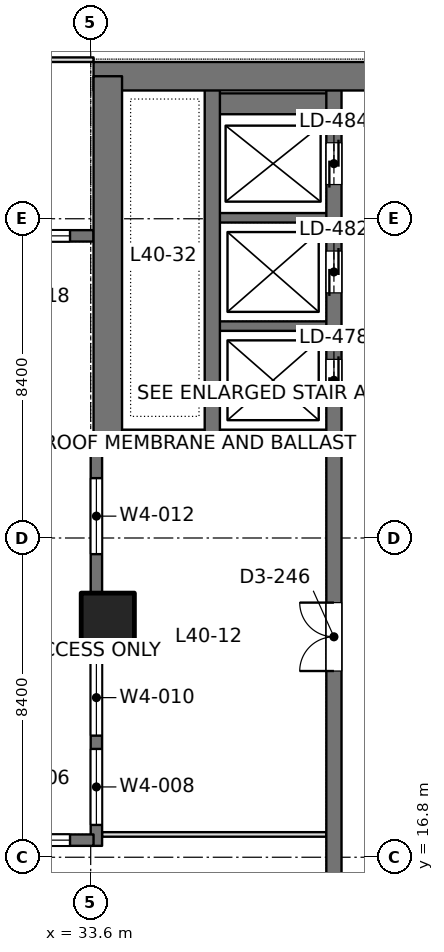
"""IFC4 building model, lengths in metres.
Left out: names, types, materials, properties, quantities, classifications, styles, units other than length and angle.
Written with IfcOpenShell. Run it as: python <this file> out.ifc"""

import sys

from ifc_helpers import new_model, si_unit, direction, frame, frame_2d, origin, origin_2d, place, context, subcontext, project, spatial, rectangle, extrude, element, fill, save


model = new_model("IFC4")
c1 = context("Model", 3, precision=1e-05, world=origin(), true_north=direction((0.0, 1.0)))
c2 = subcontext(c1, "Body", "Model", "MODEL_VIEW")
j1 = project(units=[si_unit("LENGTHUNIT", "METRE"), si_unit("PLANEANGLEUNIT", "RADIAN")], contexts=[c1])
p1 = place(None, origin())
s1 = spatial("IfcSite", under=j1, at=p1, CompositionType="ELEMENT")
p2 = place(p1, origin())
s2 = spatial("IfcBuilding", under=s1, at=p2, CompositionType="ELEMENT")
p3 = place(p2, frame((0.0, 0.0, 177.6)))
s3 = spatial("IfcBuildingStorey", under=s2, at=p3, CompositionType="ELEMENT", Elevation=177.6)
p4 = place(p3, frame((34.05, 23.05, 0.0), z_axis=(0.0, 0.0, 1.0), x_axis=(1.0, 0.0, 0.0)))
e1 = element("IfcColumn", 1, at=p4, inside=s3, PredefinedType="COLUMN", context=c2, shape_type="SweptSolid", body=[
    extrude(rectangle(XDim=1.4, YDim=1.4, at=origin_2d()), origin(), (0.0, 0.0, 1.0), 4.2),
])
p5 = place(p3, frame((33.675, 37.35, 0.0), z_axis=(0.0, 0.0, 1.0), x_axis=(1.0, 0.0, 0.0)))
e2 = element("IfcWall", 2, at=p5, inside=s3, PredefinedType="SHEAR", context=c2, shape_type="SweptSolid", body=[
    extrude(rectangle(XDim=17.85, YDim=0.75, at=frame_2d((8.925, 0.0))), origin(), (0.0, 0.0, 1.0), 4.2),
])
p6 = place(p5, frame((7.175, 0.0, 0.0)))
e3 = element("IfcOpeningElement", 3, at=p6, cuts=e2, PredefinedType="OPENING", context=c2, shape_type="SweptSolid", body=[
    extrude(rectangle(XDim=1.8, YDim=2.4, at=frame_2d((0.9, 1.2))), frame((0.0, 0.385, 0.0), z_axis=(0.0, -1.0, 0.0), x_axis=(1.0, 0.0, 0.0)), (0.0, 0.0, 1.0), 0.77),
])
p7 = place(p3, frame((34.05, 27.8, 0.0), z_axis=(0.0, 0.0, 1.0), x_axis=(0.0, 1.0, 0.0)))
e4 = element("IfcWall", 4, at=p7, inside=s3, PredefinedType="SHEAR", context=c2, shape_type="SweptSolid", body=[
    extrude(rectangle(XDim=9.55, YDim=0.75, at=frame_2d((4.775, 0.0))), origin(), (0.0, 0.0, 1.0), 4.2),
])
p8 = place(p3, frame((40.0, 13.05, 0.0), z_axis=(0.0, 0.0, 1.0), x_axis=(0.0, 1.0, 0.0)))
e5 = element("IfcWall", 5, at=p8, inside=s3, PredefinedType="SHEAR", context=c2, shape_type="SweptSolid", body=[
    extrude(rectangle(XDim=24.3, YDim=0.4, at=frame_2d((12.15, 0.0))), origin(), (0.0, 0.0, 1.0), 4.2),
])
p9 = place(p8, frame((15.75, 0.0, 0.0)))
e6 = element("IfcOpeningElement", 6, at=p9, cuts=e5, PredefinedType="OPENING", context=c2, shape_type="SweptSolid", body=[
    extrude(rectangle(XDim=1.1, YDim=2.2, at=frame_2d((0.55, 1.1))), frame((0.0, 0.21, 0.0), z_axis=(0.0, -1.0, 0.0), x_axis=(1.0, 0.0, 0.0)), (0.0, 0.0, 1.0), 0.42),
])
p10 = place(p8, frame((18.6, 0.0, 0.0)))
e7 = element("IfcOpeningElement", 7, at=p10, cuts=e5, PredefinedType="OPENING", context=c2, shape_type="SweptSolid", body=[
    extrude(rectangle(XDim=1.1, YDim=2.2, at=frame_2d((0.55, 1.1))), frame((0.0, 0.21, 0.0), z_axis=(0.0, -1.0, 0.0), x_axis=(1.0, 0.0, 0.0)), (0.0, 0.0, 1.0), 0.42),
])
p11 = place(p8, frame((21.45, 0.0, 0.0)))
e8 = element("IfcOpeningElement", 8, at=p11, cuts=e5, PredefinedType="OPENING", context=c2, shape_type="SweptSolid", body=[
    extrude(rectangle(XDim=1.1, YDim=2.2, at=frame_2d((0.55, 1.1))), frame((0.0, 0.21, 0.0), z_axis=(0.0, -1.0, 0.0), x_axis=(1.0, 0.0, 0.0)), (0.0, 0.0, 1.0), 0.42),
])
p12 = place(p8, frame((8.65, 0.0, 0.0)))
e9 = element("IfcOpeningElement", 9, at=p12, cuts=e5, PredefinedType="OPENING", context=c2, shape_type="SweptSolid", body=[
    extrude(rectangle(XDim=1.8, YDim=2.4, at=frame_2d((0.9, 1.2))), frame((0.0, 0.21, 0.0), z_axis=(0.0, -1.0, 0.0), x_axis=(1.0, 0.0, 0.0)), (0.0, 0.0, 1.0), 0.42),
])
p13 = place(p3, frame((36.8, 27.925, 0.0), z_axis=(0.0, 0.0, 1.0), x_axis=(0.0, 1.0, 0.0)))
e10 = element("IfcWall", 10, at=p13, inside=s3, PredefinedType="SHEAR", context=c2, shape_type="SweptSolid", body=[
    extrude(rectangle(XDim=9.425, YDim=0.4, at=frame_2d((4.712, 0.0))), origin(), (0.0, 0.0, 1.0), 4.2),
])
p14 = place(p3, frame((40.0, 27.925, 0.0), z_axis=(0.0, 0.0, 1.0), x_axis=(-1.0, 0.0, 0.0)))
e11 = element("IfcWall", 11, at=p14, inside=s3, PredefinedType="SHEAR", context=c2, shape_type="SweptSolid", body=[
    extrude(rectangle(XDim=5.95, YDim=0.25, at=frame_2d((2.975, 0.0))), origin(), (0.0, 0.0, 1.0), 4.2),
])
for number, where, z_axis, x_axis in (
    (12, (40.0, 30.775, 0.0), (0.0, 0.0, 1.0), (-1.0, 0.0, 0.0)),
    (13, (40.0, 33.625, 0.0), (0.0, 0.0, 1.0), (-1.0, 0.0, 0.0)),
):
    element("IfcWall", number, at=place(p3, frame(where, z_axis=z_axis, x_axis=x_axis)), inside=s3, PredefinedType="SHEAR", context=c2, shape_type="SweptSolid", body=[
        extrude(rectangle(XDim=3.2, YDim=0.25, at=frame_2d((1.6, 0.0))), origin(), (0.0, 0.0, 1.0), 4.2),
    ])
p15 = place(p3, frame((40.0, 36.625, 0.0), z_axis=(0.0, 0.0, 1.0), x_axis=(-1.0, 0.0, 0.0)))
e14 = element("IfcWall", 14, at=p15, inside=s3, PredefinedType="SHEAR", context=c2, shape_type="SweptSolid", body=[
    extrude(rectangle(XDim=3.2, YDim=0.55, at=frame_2d((1.6, 0.0))), origin(), (0.0, 0.0, 1.0), 4.2),
])
p16 = place(p3, frame((33.75, 17.1, 0.0), z_axis=(0.0, 0.0, 1.0), x_axis=(0.0, 1.0, 0.0)))
e15 = element("IfcWall", 15, at=p16, inside=s3, PredefinedType="SOLIDWALL", context=c2, shape_type="SweptSolid", body=[
    extrude(rectangle(XDim=10.7, YDim=0.3, at=frame_2d((5.35, 0.0))), origin(), (0.0, 0.0, 1.0), 4.05),
])
p17 = place(p16, frame((0.55, 0.0, 0.9)))
e16 = element("IfcOpeningElement", 16, at=p17, cuts=e15, PredefinedType="OPENING", context=c2, shape_type="SweptSolid", body=[
    extrude(rectangle(XDim=2.0, YDim=1.9, at=frame_2d((1.0, 0.95))), frame((0.0, 0.16, 0.0), z_axis=(0.0, -1.0, 0.0), x_axis=(1.0, 0.0, 0.0)), (0.0, 0.0, 1.0), 0.32),
])
p18 = place(p16, frame((2.9, 0.0, 0.9)))
e17 = element("IfcOpeningElement", 17, at=p18, cuts=e15, PredefinedType="OPENING", context=c2, shape_type="SweptSolid", body=[
    extrude(rectangle(XDim=2.0, YDim=1.9, at=frame_2d((1.0, 0.95))), frame((0.0, 0.16, 0.0), z_axis=(0.0, -1.0, 0.0), x_axis=(1.0, 0.0, 0.0)), (0.0, 0.0, 1.0), 0.32),
])
p19 = place(p16, frame((7.675, 0.0, 0.9)))
e18 = element("IfcOpeningElement", 18, at=p19, cuts=e15, PredefinedType="OPENING", context=c2, shape_type="SweptSolid", body=[
    extrude(rectangle(XDim=2.0, YDim=1.9, at=frame_2d((1.0, 0.95))), frame((0.0, 0.16, 0.0), z_axis=(0.0, -1.0, 0.0), x_axis=(1.0, 0.0, 0.0)), (0.0, 0.0, 1.0), 0.32),
])
p20 = place(p3, frame((25.75, 17.25, 0.0), z_axis=(0.0, 0.0, 1.0), x_axis=(1.0, 0.0, 0.0)))
e19 = element("IfcWall", 19, at=p20, inside=s3, PredefinedType="SOLIDWALL", context=c2, shape_type="SweptSolid", body=[
    extrude(rectangle(XDim=7.925, YDim=0.3, at=frame_2d((3.962, 0.0))), origin(), (0.0, 0.0, 1.0), 4.05),
])
p21 = place(p20, frame((0.069, 0.0, 0.9)))
e20 = element("IfcOpeningElement", 20, at=p21, cuts=e19, PredefinedType="OPENING", context=c2, shape_type="SweptSolid", body=[
    extrude(rectangle(XDim=2.0, YDim=1.9, at=frame_2d((1.0, 0.95))), frame((0.0, 0.16, 0.0), z_axis=(0.0, -1.0, 0.0), x_axis=(1.0, 0.0, 0.0)), (0.0, 0.0, 1.0), 0.32),
])
p22 = place(p20, frame((2.688, 0.0, 0.9)))
e21 = element("IfcOpeningElement", 21, at=p22, cuts=e19, PredefinedType="OPENING", context=c2, shape_type="SweptSolid", body=[
    extrude(rectangle(XDim=2.0, YDim=1.9, at=frame_2d((1.0, 0.95))), frame((0.0, 0.16, 0.0), z_axis=(0.0, -1.0, 0.0), x_axis=(1.0, 0.0, 0.0)), (0.0, 0.0, 1.0), 0.32),
])
p23 = place(p20, frame((5.306, 0.0, 0.9)))
e22 = element("IfcOpeningElement", 22, at=p23, cuts=e19, PredefinedType="OPENING", context=c2, shape_type="SweptSolid", body=[
    extrude(rectangle(XDim=2.0, YDim=1.9, at=frame_2d((1.0, 0.95))), frame((0.0, 0.16, 0.0), z_axis=(0.0, -1.0, 0.0), x_axis=(1.0, 0.0, 0.0)), (0.0, 0.0, 1.0), 0.32),
])
p24 = place(p3, frame((25.75, 33.15, 0.0), z_axis=(0.0, 0.0, 1.0), x_axis=(1.0, 0.0, 0.0)))
e23 = element("IfcWall", 23, at=p24, inside=s3, PredefinedType="SOLIDWALL", context=c2, shape_type="SweptSolid", body=[
    extrude(rectangle(XDim=7.925, YDim=0.3, at=frame_2d((3.962, 0.0))), origin(), (0.0, 0.0, 1.0), 4.05),
])
p25 = place(p24, frame((0.069, 0.0, 0.9)))
e24 = element("IfcOpeningElement", 24, at=p25, cuts=e23, PredefinedType="OPENING", context=c2, shape_type="SweptSolid", body=[
    extrude(rectangle(XDim=2.0, YDim=1.9, at=frame_2d((1.0, 0.95))), frame((0.0, 0.16, 0.0), z_axis=(0.0, -1.0, 0.0), x_axis=(1.0, 0.0, 0.0)), (0.0, 0.0, 1.0), 0.32),
])
p26 = place(p24, frame((2.688, 0.0, 0.9)))
e25 = element("IfcOpeningElement", 25, at=p26, cuts=e23, PredefinedType="OPENING", context=c2, shape_type="SweptSolid", body=[
    extrude(rectangle(XDim=2.0, YDim=1.9, at=frame_2d((1.0, 0.95))), frame((0.0, 0.16, 0.0), z_axis=(0.0, -1.0, 0.0), x_axis=(1.0, 0.0, 0.0)), (0.0, 0.0, 1.0), 0.32),
])
p27 = place(p24, frame((5.306, 0.0, 0.9)))
e26 = element("IfcOpeningElement", 26, at=p27, cuts=e23, PredefinedType="OPENING", context=c2, shape_type="SweptSolid", body=[
    extrude(rectangle(XDim=2.0, YDim=1.9, at=frame_2d((1.0, 0.95))), frame((0.0, 0.16, 0.0), z_axis=(0.0, -1.0, 0.0), x_axis=(1.0, 0.0, 0.0)), (0.0, 0.0, 1.0), 0.32),
])
p28 = place(p3, frame((33.898, 17.4, 0.0), z_axis=(0.0, 0.0, 1.0), x_axis=(1.0, 0.0, 0.0)))
e27 = element("IfcWall", 27, at=p28, inside=s3, PredefinedType="PARTITIONING", context=c2, shape_type="SweptSolid", body=[
    extrude(rectangle(XDim=5.904, YDim=0.12, at=frame_2d((2.952, 0.0))), origin(), (0.0, 0.0, 1.0), 3.55),
])
p29 = place(p3, frame((16.725, 37.785, 0.0), z_axis=(0.0, 0.0, 1.0), x_axis=(1.0, 0.0, 0.0)))
e28 = element("IfcWall", 28, at=p29, inside=s3, PredefinedType="PARTITIONING", context=c2, shape_type="SweptSolid", body=[
    extrude(rectangle(XDim=16.95, YDim=0.12, at=frame_2d((8.475, 0.0))), origin(), (0.0, 0.0, 1.0), 3.55),
])
p30 = place(p29, frame((7.575, 0.0, 0.0)))
e29 = element("IfcOpeningElement", 29, at=p30, cuts=e28, PredefinedType="OPENING", context=c2, shape_type="SweptSolid", body=[
    extrude(rectangle(XDim=1.8, YDim=2.2, at=frame_2d((0.9, 1.1))), frame((0.0, 0.07, 0.0), z_axis=(0.0, -1.0, 0.0), x_axis=(1.0, 0.0, 0.0)), (0.0, 0.0, 1.0), 0.14),
])
p31 = place(p17, origin())
e30 = element("IfcWindow", 30, at=p31, inside=s3, PartitioningType="SINGLE_PANEL", PredefinedType="WINDOW", context=c2, shape_type="SweptSolid", body=[
    extrude(rectangle(XDim=2.0, YDim=1.9, at=frame_2d((1.0, 0.95))), frame((0.0, 0.03, 0.0), z_axis=(0.0, -1.0, 0.0), x_axis=(1.0, 0.0, 0.0)), (0.0, 0.0, 1.0), 0.06),
])
fill(e16, e30)
p32 = place(p18, origin())
e31 = element("IfcWindow", 31, at=p32, inside=s3, PartitioningType="SINGLE_PANEL", PredefinedType="WINDOW", context=c2, shape_type="SweptSolid", body=[
    extrude(rectangle(XDim=2.0, YDim=1.9, at=frame_2d((1.0, 0.95))), frame((0.0, 0.03, 0.0), z_axis=(0.0, -1.0, 0.0), x_axis=(1.0, 0.0, 0.0)), (0.0, 0.0, 1.0), 0.06),
])
fill(e17, e31)
p33 = place(p19, origin())
e32 = element("IfcWindow", 32, at=p33, inside=s3, PartitioningType="SINGLE_PANEL", PredefinedType="WINDOW", context=c2, shape_type="SweptSolid", body=[
    extrude(rectangle(XDim=2.0, YDim=1.9, at=frame_2d((1.0, 0.95))), frame((0.0, 0.03, 0.0), z_axis=(0.0, -1.0, 0.0), x_axis=(1.0, 0.0, 0.0)), (0.0, 0.0, 1.0), 0.06),
])
fill(e18, e32)
p34 = place(p23, origin())
e33 = element("IfcWindow", 33, at=p34, inside=s3, PartitioningType="SINGLE_PANEL", PredefinedType="WINDOW", context=c2, shape_type="SweptSolid", body=[
    extrude(rectangle(XDim=2.0, YDim=1.9, at=frame_2d((1.0, 0.95))), frame((0.0, 0.03, 0.0), z_axis=(0.0, -1.0, 0.0), x_axis=(1.0, 0.0, 0.0)), (0.0, 0.0, 1.0), 0.06),
])
fill(e22, e33)
p35 = place(p27, origin())
e34 = element("IfcWindow", 34, at=p35, inside=s3, PartitioningType="SINGLE_PANEL", PredefinedType="WINDOW", context=c2, shape_type="SweptSolid", body=[
    extrude(rectangle(XDim=2.0, YDim=1.9, at=frame_2d((1.0, 0.95))), frame((0.0, 0.03, 0.0), z_axis=(0.0, -1.0, 0.0), x_axis=(1.0, 0.0, 0.0)), (0.0, 0.0, 1.0), 0.06),
])
fill(e26, e34)
p36 = place(p9, origin())
e35 = element("IfcDoor", 35, at=p36, inside=s3, OperationType="DOUBLE_DOOR_SLIDING", PredefinedType="DOOR", context=c2, shape_type="SweptSolid", body=[
    extrude(rectangle(XDim=1.1, YDim=2.2, at=frame_2d((0.55, 1.1))), frame((0.0, 0.025, 0.0), z_axis=(0.0, -1.0, 0.0), x_axis=(1.0, 0.0, 0.0)), (0.0, 0.0, 1.0), 0.05),
])
fill(e6, e35)
p37 = place(p10, origin())
e36 = element("IfcDoor", 36, at=p37, inside=s3, OperationType="DOUBLE_DOOR_SLIDING", PredefinedType="DOOR", context=c2, shape_type="SweptSolid", body=[
    extrude(rectangle(XDim=1.1, YDim=2.2, at=frame_2d((0.55, 1.1))), frame((0.0, 0.025, 0.0), z_axis=(0.0, -1.0, 0.0), x_axis=(1.0, 0.0, 0.0)), (0.0, 0.0, 1.0), 0.05),
])
fill(e7, e36)
p38 = place(p11, origin())
e37 = element("IfcDoor", 37, at=p38, inside=s3, OperationType="DOUBLE_DOOR_SLIDING", PredefinedType="DOOR", context=c2, shape_type="SweptSolid", body=[
    extrude(rectangle(XDim=1.1, YDim=2.2, at=frame_2d((0.55, 1.1))), frame((0.0, 0.025, 0.0), z_axis=(0.0, -1.0, 0.0), x_axis=(1.0, 0.0, 0.0)), (0.0, 0.0, 1.0), 0.05),
])
fill(e8, e37)
p39 = place(p12, origin())
e38 = element("IfcDoor", 38, at=p39, inside=s3, OperationType="DOUBLE_DOOR_SINGLE_SWING", PredefinedType="DOOR", context=c2, shape_type="SweptSolid", body=[
    extrude(rectangle(XDim=1.8, YDim=2.4, at=frame_2d((0.9, 1.2))), frame((0.0, 0.025, 0.0), z_axis=(0.0, -1.0, 0.0), x_axis=(1.0, 0.0, 0.0)), (0.0, 0.0, 1.0), 0.05),
])
fill(e9, e38)
save(model, sys.argv[1])
